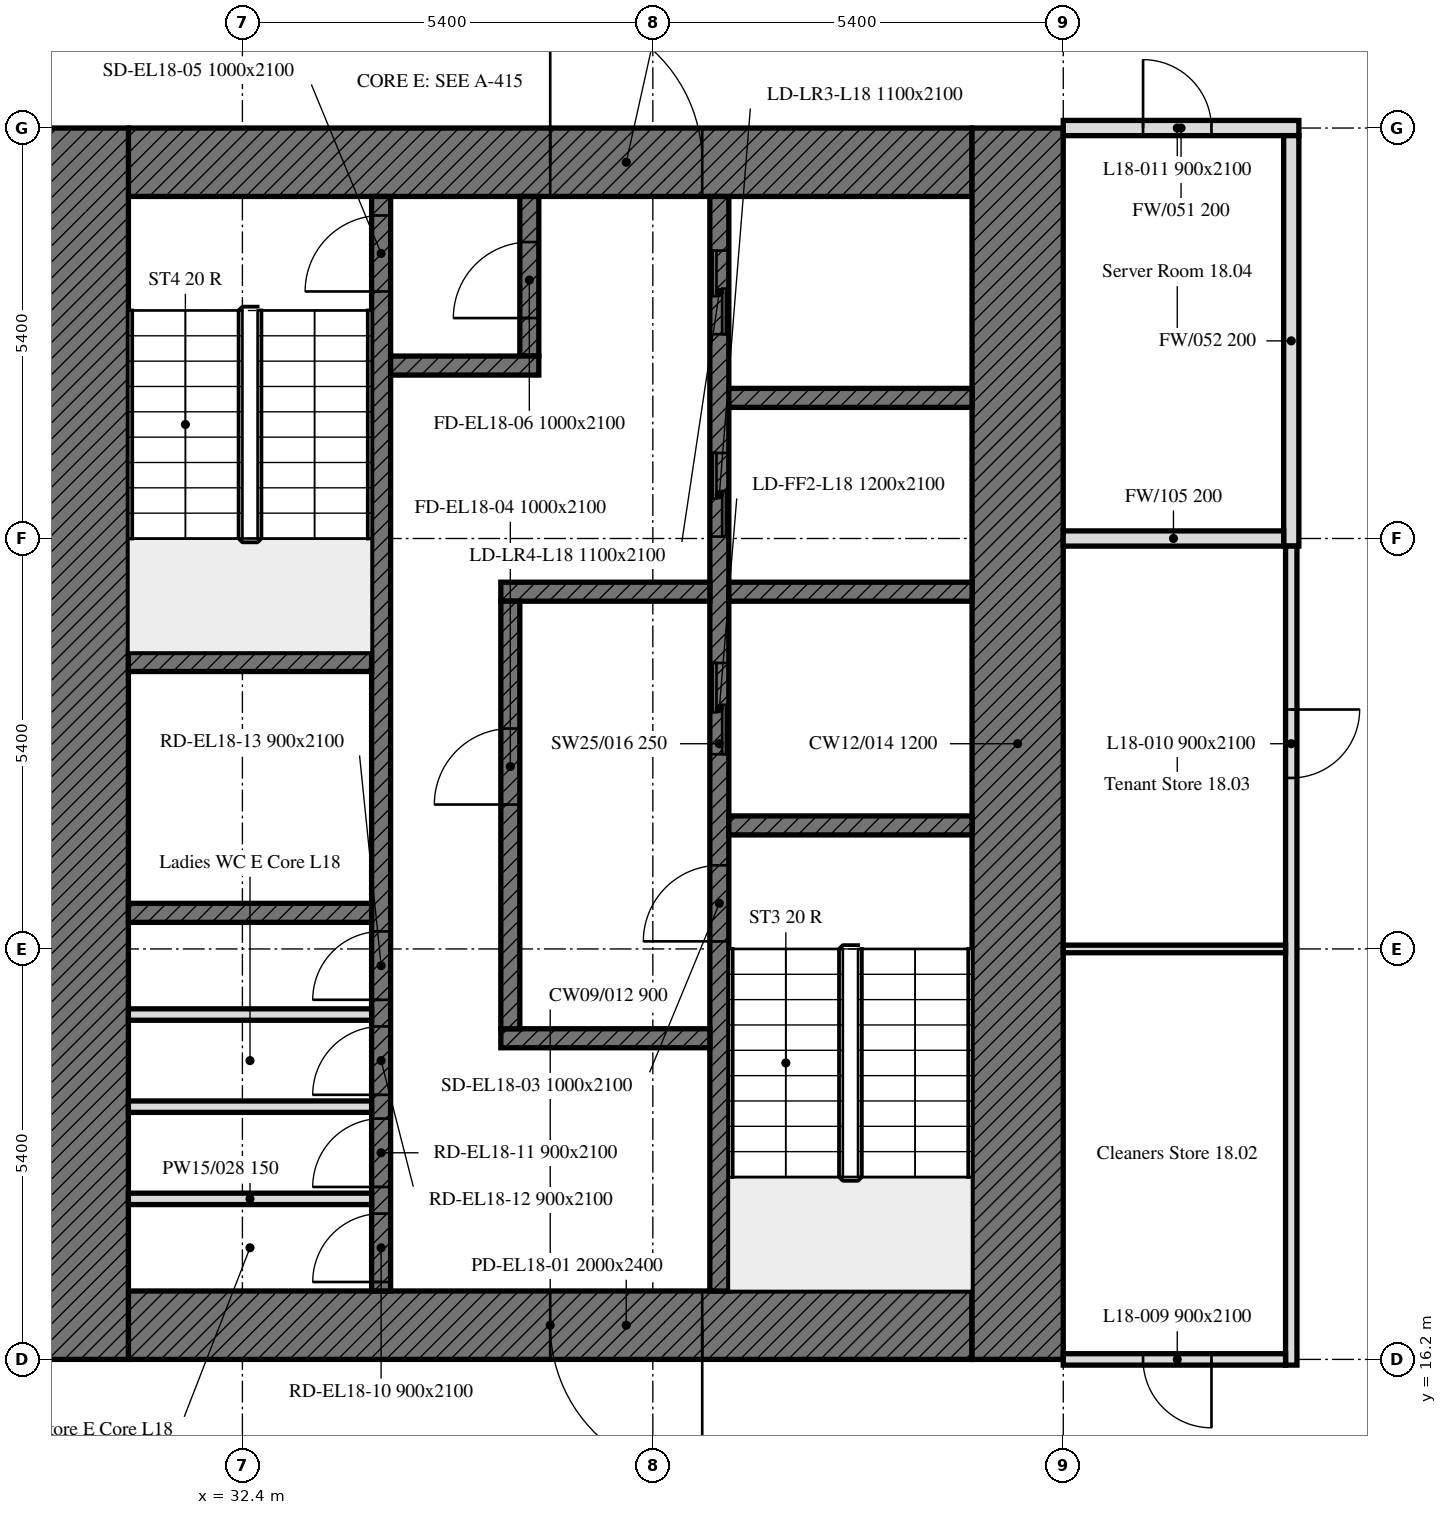
"""IFC4 building model, lengths in metres.
Left out: names, types, materials, properties, quantities, classifications, styles, units other than length and angle.
Written with IfcOpenShell. Run it as: python <this file> out.ifc"""

import sys

from ifc_helpers import new_model, si_unit, direction, frame, frame_2d, origin, place, context, subcontext, project, spatial, rectangle, extrude, element, fill, save


model = new_model("IFC4")
c1 = context("Model", 3, precision=1e-05, world=origin(), true_north=direction((0.0, 1.0)))
c2 = subcontext(c1, "Body", "Model", "MODEL_VIEW")
j1 = project(units=[si_unit("LENGTHUNIT", "METRE"), si_unit("PLANEANGLEUNIT", "RADIAN")], contexts=[c1])
p1 = place(None, origin())
s1 = spatial("IfcSite", under=j1, at=p1, CompositionType="ELEMENT")
p2 = place(p1, origin())
s2 = spatial("IfcBuilding", under=s1, at=p2, CompositionType="ELEMENT")
p3 = place(p2, frame((0.0, 0.0, 80.2)))
s3 = spatial("IfcBuildingStorey", under=s2, at=p3, CompositionType="ELEMENT", Elevation=80.2)
p4 = place(p3, frame((42.0, 16.65, 0.0), z_axis=(0.0, 0.0, 1.0), x_axis=(-1.0, 0.0, 0.0)))
e1 = element("IfcWall", 1, at=p4, inside=s3, PredefinedType="SOLIDWALL", context=c2, shape_type="SweptSolid", body=[
    extrude(rectangle(XDim=11.1, YDim=0.9, at=frame_2d((5.55, 0.0))), origin(), (0.0, 0.0, 1.0), 3.5),
])
p5 = place(p4, frame((3.55, 0.0, 0.0)))
e2 = element("IfcOpeningElement", 2, at=p5, cuts=e1, PredefinedType="OPENING", context=c2, shape_type="SweptSolid", body=[
    extrude(rectangle(XDim=2.0, YDim=2.4, at=frame_2d((1.0, 1.2))), frame((0.0, 0.45, 0.0), z_axis=(0.0, -1.0, 0.0), x_axis=(1.0, 0.0, 0.0)), (0.0, 0.0, 1.0), 0.9),
])
p6 = place(p3, frame((30.9, 31.95, 0.0), z_axis=(0.0, 0.0, 1.0), x_axis=(1.0, 0.0, 0.0)))
e3 = element("IfcWall", 3, at=p6, inside=s3, PredefinedType="SOLIDWALL", context=c2, shape_type="SweptSolid", body=[
    extrude(rectangle(XDim=11.1, YDim=0.9, at=frame_2d((5.55, 0.0))), origin(), (0.0, 0.0, 1.0), 3.5),
])
p7 = place(p6, frame((5.55, 0.0, 0.0)))
e4 = element("IfcOpeningElement", 4, at=p7, cuts=e3, PredefinedType="OPENING", context=c2, shape_type="SweptSolid", body=[
    extrude(rectangle(XDim=2.0, YDim=2.4, at=frame_2d((1.0, 1.2))), frame((0.0, 0.45, 0.0), z_axis=(0.0, -1.0, 0.0), x_axis=(1.0, 0.0, 0.0)), (0.0, 0.0, 1.0), 0.9),
])
for number, where, z_axis, x_axis in (
    (5, (42.6, 32.4, 0.0), (0.0, 0.0, 1.0), (0.0, -1.0, 0.0)),
    (6, (30.3, 16.2, 0.0), (0.0, 0.0, 1.0), (0.0, 1.0, 0.0)),
):
    element("IfcWall", number, at=place(p3, frame(where, z_axis=z_axis, x_axis=x_axis)), inside=s3, PredefinedType="SOLIDWALL", context=c2, shape_type="SweptSolid", body=[
        extrude(rectangle(XDim=16.2, YDim=1.2, at=frame_2d((8.1, 0.0))), origin(), (0.0, 0.0, 1.0), 3.5),
    ])
p8 = place(p3, frame((38.675, 17.1, 0.0), z_axis=(0.0, 0.0, 1.0), x_axis=(0.0, 1.0, 0.0)))
e7 = element("IfcWall", 7, at=p8, inside=s3, PredefinedType="SOLIDWALL", context=c2, shape_type="SweptSolid", body=[
    extrude(rectangle(XDim=14.4, YDim=0.25, at=frame_2d((7.2, 0.0))), origin(), (0.0, 0.0, 1.0), 3.5),
])
p9 = place(p8, frame((4.6, 0.0, 0.0)))
e8 = element("IfcOpeningElement", 8, at=p9, cuts=e7, PredefinedType="OPENING", context=c2, shape_type="SweptSolid", body=[
    extrude(rectangle(XDim=1.0, YDim=2.1, at=frame_2d((0.5, 1.05))), frame((0.0, 0.125, 0.0), z_axis=(0.0, -1.0, 0.0), x_axis=(1.0, 0.0, 0.0)), (0.0, 0.0, 1.0), 0.25),
])
p10 = place(p8, frame((7.062, 0.0, 0.0)))
e9 = element("IfcOpeningElement", 9, at=p10, cuts=e7, PredefinedType="OPENING", context=c2, shape_type="SweptSolid", body=[
    extrude(rectangle(XDim=1.2, YDim=2.1, at=frame_2d((0.6, 1.05))), frame((0.0, 0.125, 0.0), z_axis=(0.0, -1.0, 0.0), x_axis=(1.0, 0.0, 0.0)), (0.0, 0.0, 1.0), 0.25),
])
p11 = place(p8, frame((9.925, 0.0, 0.0)))
e10 = element("IfcOpeningElement", 10, at=p11, cuts=e7, PredefinedType="OPENING", context=c2, shape_type="SweptSolid", body=[
    extrude(rectangle(XDim=1.1, YDim=2.1, at=frame_2d((0.55, 1.05))), frame((0.0, 0.125, 0.0), z_axis=(0.0, -1.0, 0.0), x_axis=(1.0, 0.0, 0.0)), (0.0, 0.0, 1.0), 0.25),
])
p12 = place(p8, frame((12.587, 0.0, 0.0)))
e11 = element("IfcOpeningElement", 11, at=p12, cuts=e7, PredefinedType="OPENING", context=c2, shape_type="SweptSolid", body=[
    extrude(rectangle(XDim=1.1, YDim=2.1, at=frame_2d((0.55, 1.05))), frame((0.0, 0.125, 0.0), z_axis=(0.0, -1.0, 0.0), x_axis=(1.0, 0.0, 0.0)), (0.0, 0.0, 1.0), 0.25),
])
p13 = place(p3, frame((34.225, 17.1, 0.0), z_axis=(0.0, 0.0, 1.0), x_axis=(0.0, 1.0, 0.0)))
e12 = element("IfcWall", 12, at=p13, inside=s3, PredefinedType="SOLIDWALL", context=c2, shape_type="SweptSolid", body=[
    extrude(rectangle(XDim=14.4, YDim=0.25, at=frame_2d((7.2, 0.0))), origin(), (0.0, 0.0, 1.0), 3.5),
])
p14 = place(p13, frame((13.15, 0.0, 0.0)))
e13 = element("IfcOpeningElement", 13, at=p14, cuts=e12, PredefinedType="OPENING", context=c2, shape_type="SweptSolid", body=[
    extrude(rectangle(XDim=1.0, YDim=2.1, at=frame_2d((0.5, 1.05))), frame((0.0, 0.125, 0.0), z_axis=(0.0, -1.0, 0.0), x_axis=(1.0, 0.0, 0.0)), (0.0, 0.0, 1.0), 0.25),
])
p15 = place(p13, frame((0.118, 0.0, 0.0)))
e14 = element("IfcOpeningElement", 14, at=p15, cuts=e12, PredefinedType="OPENING", context=c2, shape_type="SweptSolid", body=[
    extrude(rectangle(XDim=0.9, YDim=2.1, at=frame_2d((0.45, 1.05))), frame((0.0, 0.125, 0.0), z_axis=(0.0, -1.0, 0.0), x_axis=(1.0, 0.0, 0.0)), (0.0, 0.0, 1.0), 0.25),
])
p16 = place(p13, frame((1.368, 0.0, 0.0)))
e15 = element("IfcOpeningElement", 15, at=p16, cuts=e12, PredefinedType="OPENING", context=c2, shape_type="SweptSolid", body=[
    extrude(rectangle(XDim=0.9, YDim=2.1, at=frame_2d((0.45, 1.05))), frame((0.0, 0.125, 0.0), z_axis=(0.0, -1.0, 0.0), x_axis=(1.0, 0.0, 0.0)), (0.0, 0.0, 1.0), 0.25),
])
p17 = place(p13, frame((2.581, 0.0, 0.0)))
e16 = element("IfcOpeningElement", 16, at=p17, cuts=e12, PredefinedType="OPENING", context=c2, shape_type="SweptSolid", body=[
    extrude(rectangle(XDim=0.9, YDim=2.1, at=frame_2d((0.45, 1.05))), frame((0.0, 0.125, 0.0), z_axis=(0.0, -1.0, 0.0), x_axis=(1.0, 0.0, 0.0)), (0.0, 0.0, 1.0), 0.25),
])
p18 = place(p13, frame((3.831, 0.0, 0.0)))
e17 = element("IfcOpeningElement", 17, at=p18, cuts=e12, PredefinedType="OPENING", context=c2, shape_type="SweptSolid", body=[
    extrude(rectangle(XDim=0.9, YDim=2.1, at=frame_2d((0.45, 1.05))), frame((0.0, 0.125, 0.0), z_axis=(0.0, -1.0, 0.0), x_axis=(1.0, 0.0, 0.0)), (0.0, 0.0, 1.0), 0.25),
])
p19 = place(p3, frame((38.8, 23.225, 0.0), z_axis=(0.0, 0.0, 1.0), x_axis=(1.0, 0.0, 0.0)))
e18 = element("IfcWall", 18, at=p19, inside=s3, PredefinedType="SOLIDWALL", context=c2, shape_type="SweptSolid", body=[
    extrude(rectangle(XDim=3.2, YDim=0.25, at=frame_2d((1.6, 0.0))), origin(), (0.0, 0.0, 1.0), 3.5),
])
for number, where, z_axis, x_axis in (
    (19, (30.9, 25.375, 0.0), (0.0, 0.0, 1.0), (1.0, 0.0, 0.0)),
    (20, (30.9, 22.075, 0.0), (0.0, 0.0, 1.0), (1.0, 0.0, 0.0)),
):
    element("IfcWall", number, at=place(p3, frame(where, z_axis=z_axis, x_axis=x_axis)), inside=s3, PredefinedType="SOLIDWALL", context=c2, shape_type="SweptSolid", body=[
        extrude(rectangle(XDim=3.2, YDim=0.25, at=frame_2d((1.6, 0.0))), origin(), (0.0, 0.0, 1.0), 3.5),
    ])
p20 = place(p3, frame((38.8, 26.3, 0.0), z_axis=(0.0, 0.0, 1.0), x_axis=(1.0, 0.0, 0.0)))
e21 = element("IfcWall", 21, at=p20, inside=s3, PredefinedType="SOLIDWALL", context=c2, shape_type="SweptSolid", body=[
    extrude(rectangle(XDim=3.2, YDim=0.25, at=frame_2d((1.6, 0.0))), origin(), (0.0, 0.0, 1.0), 3.5),
])
for number, where, z_axis, x_axis in (
    (22, (35.8, 26.3, 0.0), (0.0, 0.0, 1.0), (1.0, 0.0, 0.0)),
    (23, (35.8, 20.425, 0.0), (0.0, 0.0, 1.0), (1.0, 0.0, 0.0)),
):
    element("IfcWall", number, at=place(p3, frame(where, z_axis=z_axis, x_axis=x_axis)), inside=s3, PredefinedType="SOLIDWALL", context=c2, shape_type="SweptSolid", body=[
        extrude(rectangle(XDim=2.75, YDim=0.25, at=frame_2d((1.375, 0.0))), origin(), (0.0, 0.0, 1.0), 3.5),
    ])
p21 = place(p3, frame((36.175, 29.4, 0.0), z_axis=(0.0, 0.0, 1.0), x_axis=(0.0, 1.0, 0.0)))
e24 = element("IfcWall", 24, at=p21, inside=s3, PredefinedType="SOLIDWALL", context=c2, shape_type="SweptSolid", body=[
    extrude(rectangle(XDim=2.1, YDim=0.25, at=frame_2d((1.05, 0.0))), origin(), (0.0, 0.0, 1.0), 3.5),
])
p22 = place(p21, frame((0.5, 0.0, 0.0)))
e25 = element("IfcOpeningElement", 25, at=p22, cuts=e24, PredefinedType="OPENING", context=c2, shape_type="SweptSolid", body=[
    extrude(rectangle(XDim=1.0, YDim=2.1, at=frame_2d((0.5, 1.05))), frame((0.0, 0.125, 0.0), z_axis=(0.0, -1.0, 0.0), x_axis=(1.0, 0.0, 0.0)), (0.0, 0.0, 1.0), 0.25),
])
p23 = place(p3, frame((34.35, 29.275, 0.0), z_axis=(0.0, 0.0, 1.0), x_axis=(1.0, 0.0, 0.0)))
e26 = element("IfcWall", 26, at=p23, inside=s3, PredefinedType="SOLIDWALL", context=c2, shape_type="SweptSolid", body=[
    extrude(rectangle(XDim=1.95, YDim=0.25, at=frame_2d((0.975, 0.0))), origin(), (0.0, 0.0, 1.0), 3.5),
])
p24 = place(p3, frame((35.925, 20.55, 0.0), z_axis=(0.0, 0.0, 1.0), x_axis=(0.0, 1.0, 0.0)))
e27 = element("IfcWall", 27, at=p24, inside=s3, PredefinedType="SOLIDWALL", context=c2, shape_type="SweptSolid", body=[
    extrude(rectangle(XDim=5.625, YDim=0.25, at=frame_2d((2.812, 0.0))), origin(), (0.0, 0.0, 1.0), 3.5),
])
p25 = place(p24, frame((2.95, 0.0, 0.0)))
e28 = element("IfcOpeningElement", 28, at=p25, cuts=e27, PredefinedType="OPENING", context=c2, shape_type="SweptSolid", body=[
    extrude(rectangle(XDim=1.0, YDim=2.1, at=frame_2d((0.5, 1.05))), frame((0.0, 0.125, 0.0), z_axis=(0.0, -1.0, 0.0), x_axis=(1.0, 0.0, 0.0)), (0.0, 0.0, 1.0), 0.25),
])
p26 = place(p3, frame((38.8, 28.85, 0.0), z_axis=(0.0, 0.0, 1.0), x_axis=(1.0, 0.0, 0.0)))
e29 = element("IfcWall", 29, at=p26, inside=s3, PredefinedType="SOLIDWALL", context=c2, shape_type="SweptSolid", body=[
    extrude(rectangle(XDim=3.2, YDim=0.25, at=frame_2d((1.6, 0.0))), origin(), (0.0, 0.0, 1.0), 3.5),
])
for number, where, z_axis, x_axis in (
    (30, (30.9, 18.312, 0.0), (0.0, 0.0, 1.0), (1.0, 0.0, 0.0)),
    (31, (30.9, 19.525, 0.0), (0.0, 0.0, 1.0), (1.0, 0.0, 0.0)),
    (32, (30.9, 20.737, 0.0), (0.0, 0.0, 1.0), (1.0, 0.0, 0.0)),
):
    element("IfcWall", number, at=place(p3, frame(where, z_axis=z_axis, x_axis=x_axis)), inside=s3, PredefinedType="PARTITIONING", context=c2, shape_type="SweptSolid", body=[
        extrude(rectangle(XDim=3.2, YDim=0.15, at=frame_2d((1.6, 0.0))), origin(), (0.0, 0.0, 1.0), 3.5),
    ])
p27 = place(p3, frame((43.2, 32.4, 0.0), z_axis=(0.0, 0.0, 1.0), x_axis=(1.0, 0.0, 0.0)))
e33 = element("IfcWall", 33, at=p27, inside=s3, PredefinedType="PARTITIONING", context=c2, shape_type="SweptSolid", body=[
    extrude(rectangle(XDim=3.1, YDim=0.2, at=frame_2d((1.55, 0.0))), origin(), (0.0, 0.0, 1.0), 2.75),
])
p28 = place(p27, frame((1.05, 0.0, 0.0)))
e34 = element("IfcOpeningElement", 34, at=p28, cuts=e33, PredefinedType="OPENING", context=c2, shape_type="SweptSolid", body=[
    extrude(rectangle(XDim=0.9, YDim=2.1, at=frame_2d((0.45, 1.05))), frame((0.0, 0.1, 0.0), z_axis=(0.0, -1.0, 0.0), x_axis=(1.0, 0.0, 0.0)), (0.0, 0.0, 1.0), 0.2),
])
p29 = place(p3, frame((46.2, 32.3, 0.0), z_axis=(0.0, 0.0, 1.0), x_axis=(0.0, -1.0, 0.0)))
e35 = element("IfcWall", 35, at=p29, inside=s3, PredefinedType="PARTITIONING", context=c2, shape_type="SweptSolid", body=[
    extrude(rectangle(XDim=5.4, YDim=0.2, at=frame_2d((2.7, 0.0))), origin(), (0.0, 0.0, 1.0), 3.5),
])
p30 = place(p3, frame((46.2, 26.9, 0.0), z_axis=(0.0, 0.0, 1.0), x_axis=(0.0, -1.0, 0.0)))
e36 = element("IfcWall", 36, at=p30, inside=s3, PredefinedType="PARTITIONING", context=c2, shape_type="SweptSolid", body=[
    extrude(rectangle(XDim=10.775, YDim=0.15, at=frame_2d((5.387, 0.0))), origin(), (0.0, 0.0, 1.0), 3.5),
])
p31 = place(p30, frame((2.15, 0.0, 0.0)))
e37 = element("IfcOpeningElement", 37, at=p31, cuts=e36, PredefinedType="OPENING", context=c2, shape_type="SweptSolid", body=[
    extrude(rectangle(XDim=0.9, YDim=2.1, at=frame_2d((0.45, 1.05))), frame((0.0, 0.075, 0.0), z_axis=(0.0, -1.0, 0.0), x_axis=(1.0, 0.0, 0.0)), (0.0, 0.0, 1.0), 0.15),
])
p32 = place(p3, frame((46.125, 16.2, 0.0), z_axis=(0.0, 0.0, 1.0), x_axis=(-1.0, 0.0, 0.0)))
e38 = element("IfcWall", 38, at=p32, inside=s3, PredefinedType="PARTITIONING", context=c2, shape_type="SweptSolid", body=[
    extrude(rectangle(XDim=2.925, YDim=0.15, at=frame_2d((1.462, 0.0))), origin(), (0.0, 0.0, 1.0), 2.75),
])
p33 = place(p32, frame((0.975, 0.0, 0.0)))
e39 = element("IfcOpeningElement", 39, at=p33, cuts=e38, PredefinedType="OPENING", context=c2, shape_type="SweptSolid", body=[
    extrude(rectangle(XDim=0.9, YDim=2.1, at=frame_2d((0.45, 1.05))), frame((0.0, 0.075, 0.0), z_axis=(0.0, -1.0, 0.0), x_axis=(1.0, 0.0, 0.0)), (0.0, 0.0, 1.0), 0.15),
])
p34 = place(p3, frame((46.125, 21.6, 0.0), z_axis=(0.0, 0.0, 1.0), x_axis=(-1.0, 0.0, 0.0)))
e40 = element("IfcWall", 40, at=p34, inside=s3, PredefinedType="PARTITIONING", context=c2, shape_type="SweptSolid", body=[
    extrude(rectangle(XDim=2.925, YDim=0.1, at=frame_2d((1.462, 0.0))), origin(), (0.0, 0.0, 1.0), 2.75),
])
p35 = place(p3, frame((46.1, 27.0, 0.0), z_axis=(0.0, 0.0, 1.0), x_axis=(-1.0, 0.0, 0.0)))
e41 = element("IfcWall", 41, at=p35, inside=s3, PredefinedType="PARTITIONING", context=c2, shape_type="SweptSolid", body=[
    extrude(rectangle(XDim=2.9, YDim=0.2, at=frame_2d((1.45, 0.0))), origin(), (0.0, 0.0, 1.0), 2.75),
])
p36 = place(p5, origin())
e42 = element("IfcDoor", 42, at=p36, inside=s3, OperationType="DOUBLE_DOOR_SINGLE_SWING", PredefinedType="DOOR", context=c2, shape_type="SweptSolid", body=[
    extrude(rectangle(XDim=2.0, YDim=2.4, at=frame_2d((1.0, 1.2))), frame((0.0, 0.025, 0.0), z_axis=(0.0, -1.0, 0.0), x_axis=(1.0, 0.0, 0.0)), (0.0, 0.0, 1.0), 0.05),
])
fill(e2, e42)
p37 = place(p7, origin())
e43 = element("IfcDoor", 43, at=p37, inside=s3, OperationType="DOUBLE_DOOR_SINGLE_SWING", PredefinedType="DOOR", context=c2, shape_type="SweptSolid", body=[
    extrude(rectangle(XDim=2.0, YDim=2.4, at=frame_2d((1.0, 1.2))), frame((0.0, 0.025, 0.0), z_axis=(0.0, -1.0, 0.0), x_axis=(1.0, 0.0, 0.0)), (0.0, 0.0, 1.0), 0.05),
])
fill(e4, e43)
p38 = place(p9, origin())
e44 = element("IfcDoor", 44, at=p38, inside=s3, OperationType="SINGLE_SWING_LEFT", PredefinedType="DOOR", context=c2, shape_type="SweptSolid", body=[
    extrude(rectangle(XDim=1.0, YDim=2.1, at=frame_2d((0.5, 1.05))), frame((0.0, 0.025, 0.0), z_axis=(0.0, -1.0, 0.0), x_axis=(1.0, 0.0, 0.0)), (0.0, 0.0, 1.0), 0.05),
])
fill(e8, e44)
p39 = place(p25, origin())
e45 = element("IfcDoor", 45, at=p39, inside=s3, OperationType="SINGLE_SWING_LEFT", PredefinedType="DOOR", context=c2, shape_type="SweptSolid", body=[
    extrude(rectangle(XDim=1.0, YDim=2.1, at=frame_2d((0.5, 1.05))), frame((0.0, 0.025, 0.0), z_axis=(0.0, -1.0, 0.0), x_axis=(1.0, 0.0, 0.0)), (0.0, 0.0, 1.0), 0.05),
])
fill(e28, e45)
p40 = place(p14, origin())
e46 = element("IfcDoor", 46, at=p40, inside=s3, OperationType="SINGLE_SWING_LEFT", PredefinedType="DOOR", context=c2, shape_type="SweptSolid", body=[
    extrude(rectangle(XDim=1.0, YDim=2.1, at=frame_2d((0.5, 1.05))), frame((0.0, 0.025, 0.0), z_axis=(0.0, -1.0, 0.0), x_axis=(1.0, 0.0, 0.0)), (0.0, 0.0, 1.0), 0.05),
])
fill(e13, e46)
p41 = place(p22, origin())
e47 = element("IfcDoor", 47, at=p41, inside=s3, OperationType="SINGLE_SWING_LEFT", PredefinedType="DOOR", context=c2, shape_type="SweptSolid", body=[
    extrude(rectangle(XDim=1.0, YDim=2.1, at=frame_2d((0.5, 1.05))), frame((0.0, 0.025, 0.0), z_axis=(0.0, -1.0, 0.0), x_axis=(1.0, 0.0, 0.0)), (0.0, 0.0, 1.0), 0.05),
])
fill(e25, e47)
p42 = place(p10, origin())
e48 = element("IfcDoor", 48, at=p42, inside=s3, OperationType="DOUBLE_DOOR_SLIDING", PredefinedType="DOOR", context=c2, shape_type="SweptSolid", body=[
    extrude(rectangle(XDim=1.2, YDim=2.1, at=frame_2d((0.6, 1.05))), frame((0.0, 0.025, 0.0), z_axis=(0.0, -1.0, 0.0), x_axis=(1.0, 0.0, 0.0)), (0.0, 0.0, 1.0), 0.05),
])
fill(e9, e48)
p43 = place(p11, origin())
e49 = element("IfcDoor", 49, at=p43, inside=s3, OperationType="DOUBLE_DOOR_SLIDING", PredefinedType="DOOR", context=c2, shape_type="SweptSolid", body=[
    extrude(rectangle(XDim=1.1, YDim=2.1, at=frame_2d((0.55, 1.05))), frame((0.0, 0.025, 0.0), z_axis=(0.0, -1.0, 0.0), x_axis=(1.0, 0.0, 0.0)), (0.0, 0.0, 1.0), 0.05),
])
fill(e10, e49)
p44 = place(p12, origin())
e50 = element("IfcDoor", 50, at=p44, inside=s3, OperationType="DOUBLE_DOOR_SLIDING", PredefinedType="DOOR", context=c2, shape_type="SweptSolid", body=[
    extrude(rectangle(XDim=1.1, YDim=2.1, at=frame_2d((0.55, 1.05))), frame((0.0, 0.025, 0.0), z_axis=(0.0, -1.0, 0.0), x_axis=(1.0, 0.0, 0.0)), (0.0, 0.0, 1.0), 0.05),
])
fill(e11, e50)
p45 = place(p15, origin())
e51 = element("IfcDoor", 51, at=p45, inside=s3, OperationType="SINGLE_SWING_LEFT", PredefinedType="DOOR", context=c2, shape_type="SweptSolid", body=[
    extrude(rectangle(XDim=0.9, YDim=2.1, at=frame_2d((0.45, 1.05))), frame((0.0, 0.025, 0.0), z_axis=(0.0, -1.0, 0.0), x_axis=(1.0, 0.0, 0.0)), (0.0, 0.0, 1.0), 0.05),
])
fill(e14, e51)
p46 = place(p16, origin())
e52 = element("IfcDoor", 52, at=p46, inside=s3, OperationType="SINGLE_SWING_LEFT", PredefinedType="DOOR", context=c2, shape_type="SweptSolid", body=[
    extrude(rectangle(XDim=0.9, YDim=2.1, at=frame_2d((0.45, 1.05))), frame((0.0, 0.025, 0.0), z_axis=(0.0, -1.0, 0.0), x_axis=(1.0, 0.0, 0.0)), (0.0, 0.0, 1.0), 0.05),
])
fill(e15, e52)
p47 = place(p17, origin())
e53 = element("IfcDoor", 53, at=p47, inside=s3, OperationType="SINGLE_SWING_LEFT", PredefinedType="DOOR", context=c2, shape_type="SweptSolid", body=[
    extrude(rectangle(XDim=0.9, YDim=2.1, at=frame_2d((0.45, 1.05))), frame((0.0, 0.025, 0.0), z_axis=(0.0, -1.0, 0.0), x_axis=(1.0, 0.0, 0.0)), (0.0, 0.0, 1.0), 0.05),
])
fill(e16, e53)
p48 = place(p18, origin())
e54 = element("IfcDoor", 54, at=p48, inside=s3, OperationType="SINGLE_SWING_LEFT", PredefinedType="DOOR", context=c2, shape_type="SweptSolid", body=[
    extrude(rectangle(XDim=0.9, YDim=2.1, at=frame_2d((0.45, 1.05))), frame((0.0, 0.025, 0.0), z_axis=(0.0, -1.0, 0.0), x_axis=(1.0, 0.0, 0.0)), (0.0, 0.0, 1.0), 0.05),
])
fill(e17, e54)
p49 = place(p33, origin())
e55 = element("IfcDoor", 55, at=p49, inside=s3, OperationType="SINGLE_SWING_RIGHT", PredefinedType="DOOR", context=c2, shape_type="SweptSolid", body=[
    extrude(rectangle(XDim=0.9, YDim=2.1, at=frame_2d((0.45, 1.05))), frame((0.0, 0.025, 0.0), z_axis=(0.0, -1.0, 0.0), x_axis=(1.0, 0.0, 0.0)), (0.0, 0.0, 1.0), 0.05),
])
fill(e39, e55)
p50 = place(p31, origin())
e56 = element("IfcDoor", 56, at=p50, inside=s3, OperationType="SINGLE_SWING_RIGHT", PredefinedType="DOOR", context=c2, shape_type="SweptSolid", body=[
    extrude(rectangle(XDim=0.9, YDim=2.1, at=frame_2d((0.45, 1.05))), frame((0.0, 0.025, 0.0), z_axis=(0.0, -1.0, 0.0), x_axis=(1.0, 0.0, 0.0)), (0.0, 0.0, 1.0), 0.05),
])
fill(e37, e56)
p51 = place(p28, origin())
e57 = element("IfcDoor", 57, at=p51, inside=s3, OperationType="SINGLE_SWING_RIGHT", PredefinedType="DOOR", context=c2, shape_type="SweptSolid", body=[
    extrude(rectangle(XDim=0.9, YDim=2.1, at=frame_2d((0.45, 1.05))), frame((0.0, 0.025, 0.0), z_axis=(0.0, -1.0, 0.0), x_axis=(1.0, 0.0, 0.0)), (0.0, 0.0, 1.0), 0.05),
])
fill(e34, e57)
save(model, sys.argv[1])
